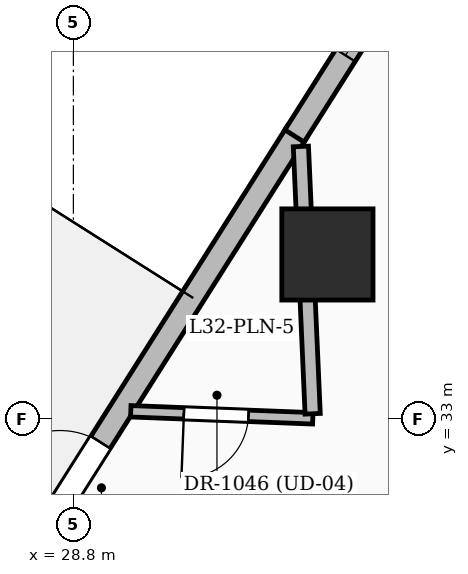
"""IFC4 building model, lengths in metres.
Left out: names, types, materials, properties, quantities, classifications, styles, units other than length and angle.
Written with IfcOpenShell. Run it as: python <this file> out.ifc"""

import sys

from ifc_helpers import new_model, si_unit, direction, frame, frame_2d, origin, origin_2d, place, context, subcontext, project, spatial, rectangle, extrude, element, fill, save


model = new_model("IFC4")
c1 = context("Model", 3, precision=1e-05, world=origin(), true_north=direction((0.0, 1.0)))
c2 = subcontext(c1, "Body", "Model", "MODEL_VIEW")
j1 = project(units=[si_unit("LENGTHUNIT", "METRE"), si_unit("PLANEANGLEUNIT", "RADIAN")], contexts=[c1])
p1 = place(None, origin())
s1 = spatial("IfcSite", under=j1, at=p1, CompositionType="ELEMENT")
p2 = place(p1, origin())
s2 = spatial("IfcBuilding", under=s1, at=p2, CompositionType="ELEMENT")
p3 = place(p2, frame((0.0, 0.0, 128.4)))
s3 = spatial("IfcBuildingStorey", under=s2, at=p3, CompositionType="ELEMENT", Elevation=128.4)
p4 = place(p3, frame((32.142, 35.166, 0.0), z_axis=(0.0, 0.0, 1.0), x_axis=(1.0, 0.0, 0.0)))
e1 = element("IfcColumn", 1, at=p4, inside=s3, PredefinedType="COLUMN", context=c2, shape_type="SweptSolid", body=[
    extrude(rectangle(XDim=1.2, YDim=1.2, at=origin_2d()), origin(), (0.0, 0.0, 1.0), 3.6),
])
p5 = place(p3, frame((27.939, 30.771, 0.0), z_axis=(0.0, 0.0, 1.0), x_axis=(0.534879578565, 0.84492830254, 0.0)))
e2 = element("IfcWall", 2, at=p5, inside=s3, PredefinedType="SOLIDWALL", context=c2, shape_type="SweptSolid", body=[
    extrude(rectangle(XDim=7.105, YDim=0.3, at=frame_2d((3.552, 0.0))), origin(), (0.0, 0.0, 1.0), 3.35),
])
p6 = place(p5, frame((1.277, 0.0, 0.0)))
e3 = element("IfcOpeningElement", 3, at=p6, cuts=e2, PredefinedType="OPENING", context=c2, shape_type="SweptSolid", body=[
    extrude(rectangle(XDim=1.0, YDim=2.2, at=frame_2d((0.5, 1.1))), frame((0.0, 0.16, 0.0), z_axis=(0.0, -1.0, 0.0), x_axis=(1.0, 0.0, 0.0)), (0.0, 0.0, 1.0), 0.32),
])
p7 = place(p3, frame((31.709, 36.725, 0.0), z_axis=(0.0, 0.0, 1.0), x_axis=(0.534918812586, 0.844903464274, 0.0)))
e4 = element("IfcWall", 4, at=p7, inside=s3, PredefinedType="SOLIDWALL", context=c2, shape_type="SweptSolid", body=[
    extrude(rectangle(XDim=6.407, YDim=0.3, at=frame_2d((3.204, 0.0))), origin(), (0.0, 0.0, 1.0), 3.35),
])
p8 = place(p7, frame((1.255, 0.0, 0.6)))
e5 = element("IfcOpeningElement", 5, at=p8, cuts=e4, PredefinedType="OPENING", context=c2, shape_type="SweptSolid", body=[
    extrude(rectangle(XDim=2.4, YDim=2.1, at=frame_2d((1.2, 1.05))), frame((0.0, 0.16, 0.0), z_axis=(0.0, -1.0, 0.0), x_axis=(1.0, 0.0, 0.0)), (0.0, 0.0, 1.0), 0.32),
])
p9 = place(p3, frame((31.95, 33.01, 0.0), z_axis=(0.0, 0.0, 1.0), x_axis=(-0.999246660103, 0.038808662334, 0.0)))
e6 = element("IfcWall", 6, at=p9, inside=s3, PredefinedType="PARTITIONING", context=c2, shape_type="SweptSolid", body=[
    extrude(rectangle(XDim=2.397, YDim=0.15, at=frame_2d((1.198, 0.0))), origin(), (0.0, 0.0, 1.0), 2.57),
])
p10 = place(p9, frame((0.847, 0.0, 0.0)))
e7 = element("IfcOpeningElement", 7, at=p10, cuts=e6, PredefinedType="OPENING", context=c2, shape_type="SweptSolid", body=[
    extrude(rectangle(XDim=0.85, YDim=2.1, at=frame_2d((0.425, 1.05))), frame((0.0, 0.085, 0.0), z_axis=(0.0, -1.0, 0.0), x_axis=(1.0, 0.0, 0.0)), (0.0, 0.0, 1.0), 0.17),
])
p11 = place(p3, frame((31.948, 33.07, 0.0), z_axis=(0.0, 0.0, 1.0), x_axis=(-0.044039147995, 0.999029806084, 0.0)))
e8 = element("IfcWall", 8, at=p11, inside=s3, PredefinedType="PARTITIONING", context=c2, shape_type="SweptSolid", body=[
    extrude(rectangle(XDim=3.52, YDim=0.2, at=frame_2d((1.76, 0.0))), origin(), (0.0, 0.0, 1.0), 1.12),
])
p12 = place(p6, origin())
e9 = element("IfcDoor", 9, at=p12, inside=s3, OperationType="SINGLE_SWING_LEFT", PredefinedType="DOOR", context=c2, shape_type="SweptSolid", body=[
    extrude(rectangle(XDim=1.0, YDim=2.2, at=frame_2d((0.5, 1.1))), frame((0.0, 0.025, 0.0), z_axis=(0.0, -1.0, 0.0), x_axis=(1.0, 0.0, 0.0)), (0.0, 0.0, 1.0), 0.05),
])
fill(e3, e9)
p13 = place(p8, origin())
e10 = element("IfcWindow", 10, at=p13, inside=s3, PartitioningType="SINGLE_PANEL", PredefinedType="WINDOW", context=c2, shape_type="SweptSolid", body=[
    extrude(rectangle(XDim=2.4, YDim=2.1, at=frame_2d((1.2, 1.05))), frame((0.0, 0.03, 0.0), z_axis=(0.0, -1.0, 0.0), x_axis=(1.0, 0.0, 0.0)), (0.0, 0.0, 1.0), 0.06),
])
fill(e5, e10)
p14 = place(p10, origin())
e11 = element("IfcDoor", 11, at=p14, inside=s3, OperationType="SINGLE_SWING_RIGHT", PredefinedType="DOOR", context=c2, shape_type="SweptSolid", body=[
    extrude(rectangle(XDim=0.85, YDim=2.1, at=frame_2d((0.425, 1.05))), frame((0.0, 0.025, 0.0), z_axis=(0.0, -1.0, 0.0), x_axis=(1.0, 0.0, 0.0)), (0.0, 0.0, 1.0), 0.05),
])
fill(e7, e11)
save(model, sys.argv[1])
